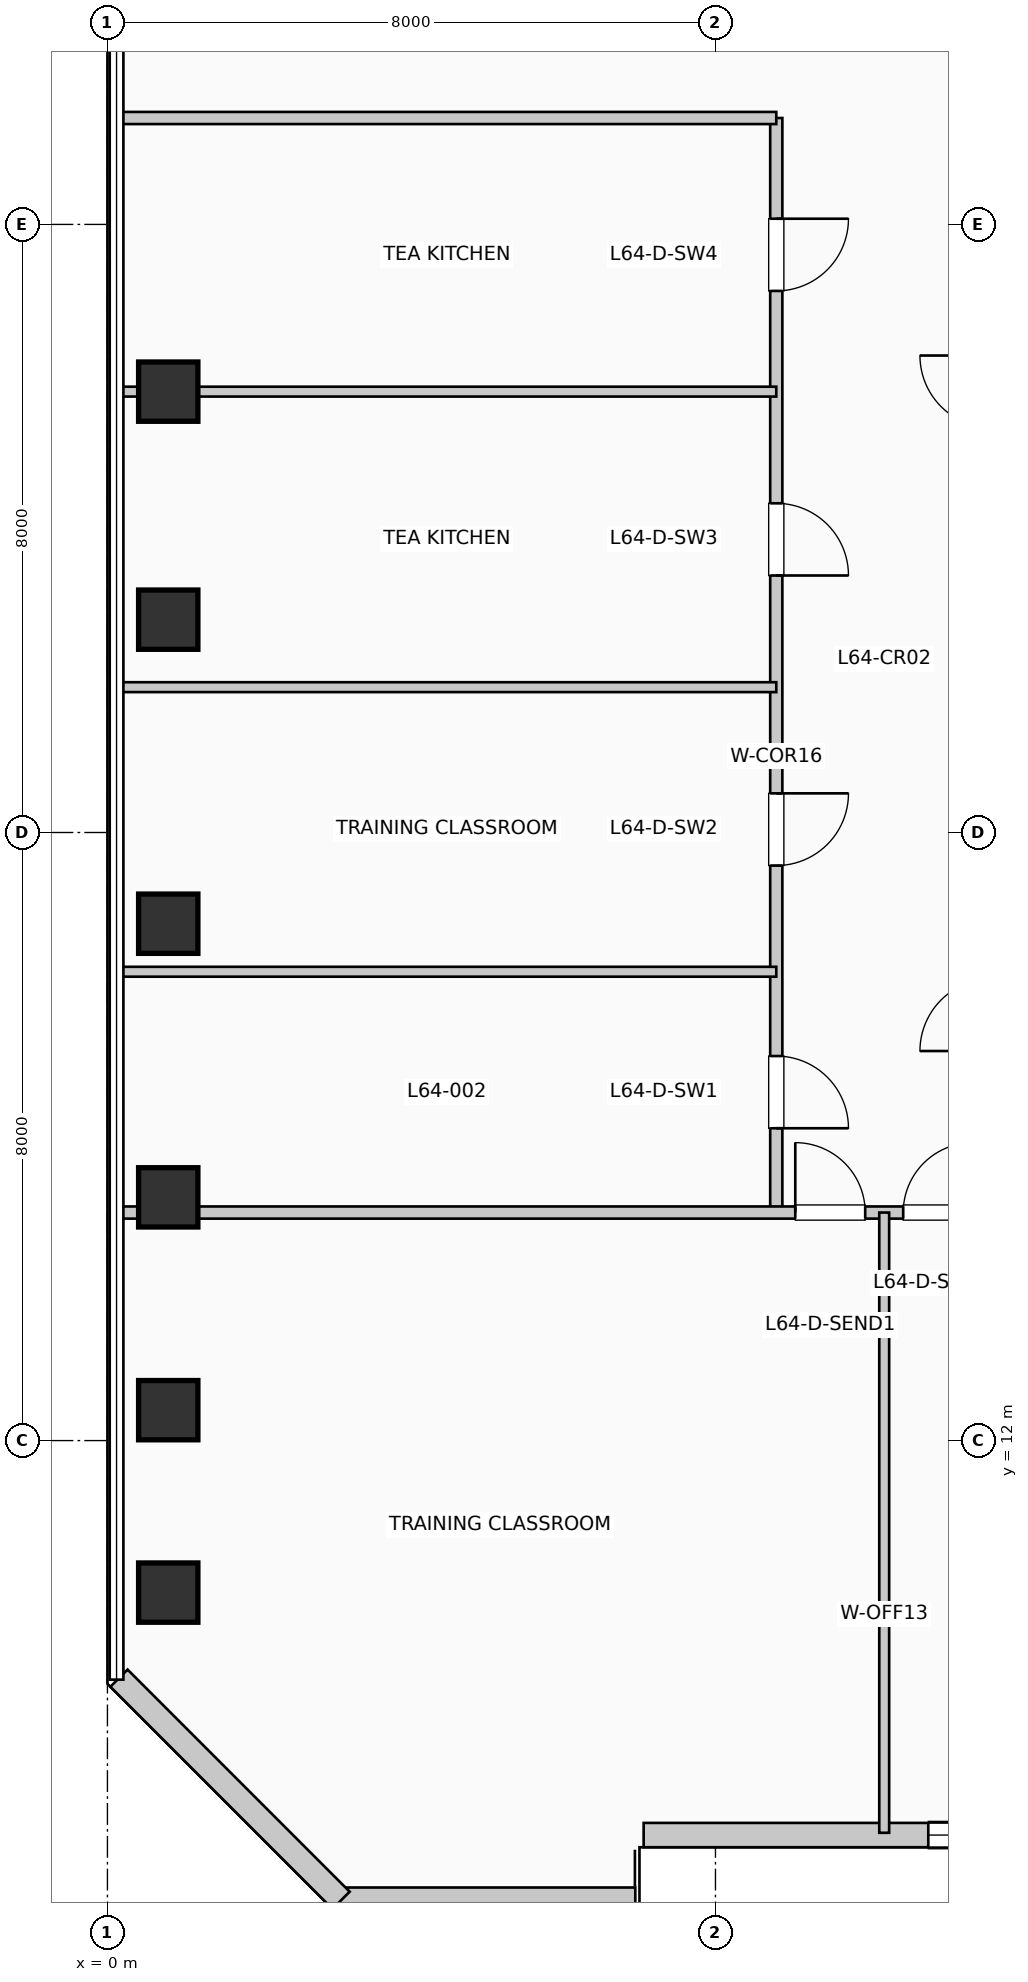
"""IFC4 building model, lengths in metres.
Left out: names, types, materials, properties, quantities, classifications, styles, units other than length and angle.
Written with IfcOpenShell. Run it as: python <this file> out.ifc"""

import sys

from ifc_helpers import new_model, si_unit, direction, frame, frame_2d, origin, origin_2d, place, context, subcontext, project, spatial, rectangle, extrude, element, fill, save


model = new_model("IFC4")
c1 = context("Model", 3, precision=1e-05, world=origin(), true_north=direction((0.0, 1.0)))
c2 = subcontext(c1, "Body", "Model", "MODEL_VIEW")
j1 = project(units=[si_unit("LENGTHUNIT", "METRE"), si_unit("PLANEANGLEUNIT", "RADIAN")], contexts=[c1])
p1 = place(None, origin())
s1 = spatial("IfcSite", under=j1, at=p1, CompositionType="ELEMENT")
p2 = place(p1, origin())
s2 = spatial("IfcBuilding", under=s1, at=p2, CompositionType="ELEMENT")
p3 = place(p2, frame((0.0, 0.0, 264.33)))
s3 = spatial("IfcBuildingStorey", under=s2, at=p3, CompositionType="ELEMENT", Elevation=264.33)
for number, where, z_axis, x_axis in (
    (1, (0.8, 10.0, 0.0), (0.0, 0.0, 1.0), (1.0, 0.0, 0.0)),
    (2, (0.8, 12.4, 0.0), (0.0, 0.0, 1.0), (1.0, 0.0, 0.0)),
    (3, (0.8, 15.2, 0.0), (0.0, 0.0, 1.0), (1.0, 0.0, 0.0)),
    (4, (0.8, 18.8, 0.0), (0.0, 0.0, 1.0), (1.0, 0.0, 0.0)),
    (5, (0.8, 22.8, 0.0), (0.0, 0.0, 1.0), (1.0, 0.0, 0.0)),
    (6, (0.8, 25.8, 0.0), (0.0, 0.0, 1.0), (1.0, 0.0, 0.0)),
):
    element("IfcColumn", number, at=place(p3, frame(where, z_axis=z_axis, x_axis=x_axis)), inside=s3, PredefinedType="COLUMN", context=c2, shape_type="SweptSolid", body=[
        extrude(rectangle(XDim=0.78, YDim=0.78, at=origin_2d()), origin(), (0.0, 0.0, 1.0), 3.96),
    ])
p4 = place(p3, frame((3.055, 5.96, 0.0), z_axis=(0.0, 0.0, 1.0), x_axis=(1.0, 0.0, 0.0)))
e7 = element("IfcWall", 7, at=p4, inside=s3, PredefinedType="SOLIDWALL", context=c2, shape_type="SweptSolid", body=[
    extrude(rectangle(XDim=3.89, YDim=0.32, at=frame_2d((1.945, 0.0))), origin(), (0.0, 0.0, 1.0), 3.71),
])
p5 = place(p3, frame((7.055, 6.81, 0.0), z_axis=(0.0, 0.0, 1.0), x_axis=(1.0, 0.0, 0.0)))
e8 = element("IfcWall", 8, at=p5, inside=s3, PredefinedType="SOLIDWALL", context=c2, shape_type="SweptSolid", body=[
    extrude(rectangle(XDim=9.89, YDim=0.32, at=frame_2d((4.945, 0.0))), origin(), (0.0, 0.0, 1.0), 3.71),
])
p6 = place(p5, frame((3.745, 0.0, 0.85)))
e9 = element("IfcOpeningElement", 9, at=p6, cuts=e8, PredefinedType="OPENING", context=c2, shape_type="SweptSolid", body=[
    extrude(rectangle(XDim=2.4, YDim=2.05, at=frame_2d((1.2, 1.025))), frame((0.0, 0.17, 0.0), z_axis=(0.0, -1.0, 0.0), x_axis=(1.0, 0.0, 0.0)), (0.0, 0.0, 1.0), 0.34),
])
p7 = place(p3, frame((0.152, 8.874, 0.0), z_axis=(0.0, 0.0, 1.0), x_axis=(0.707077242712, -0.707136318428, 0.0)))
e10 = element("IfcWall", 10, at=p7, inside=s3, PredefinedType="SOLIDWALL", context=c2, shape_type="SweptSolid", body=[
    extrude(rectangle(XDim=4.133, YDim=0.32, at=frame_2d((2.066, 0.0))), origin(), (0.0, 0.0, 1.0), 3.71),
])
p8 = place(p3, frame((8.8, 15.0, 0.0), z_axis=(0.0, 0.0, 1.0), x_axis=(0.0, 1.0, 0.0)))
e11 = element("IfcWall", 11, at=p8, inside=s3, PredefinedType="PARTITIONING", context=c2, shape_type="SweptSolid", body=[
    extrude(rectangle(XDim=14.4, YDim=0.16, at=frame_2d((7.2, 0.0))), origin(), (0.0, 0.0, 1.0), 3.71),
])
p9 = place(p8, frame((2.059, 0.0, 0.0), z_axis=(0.0, 0.0, 1.0), x_axis=(-1.0, 0.0, 0.0)))
e12 = element("IfcOpeningElement", 12, at=p9, cuts=e11, PredefinedType="OPENING", context=c2, shape_type="SweptSolid", body=[
    extrude(rectangle(XDim=0.95, YDim=2.15, at=frame_2d((0.475, 1.075))), frame((0.0, 0.09, 0.0), z_axis=(0.0, -1.0, 0.0), x_axis=(1.0, 0.0, 0.0)), (0.0, 0.0, 1.0), 0.18),
])
p10 = place(p8, frame((5.515, 0.0, 0.0), z_axis=(0.0, 0.0, 1.0), x_axis=(-1.0, 0.0, 0.0)))
e13 = element("IfcOpeningElement", 13, at=p10, cuts=e11, PredefinedType="OPENING", context=c2, shape_type="SweptSolid", body=[
    extrude(rectangle(XDim=0.95, YDim=2.15, at=frame_2d((0.475, 1.075))), frame((0.0, 0.09, 0.0), z_axis=(0.0, -1.0, 0.0), x_axis=(1.0, 0.0, 0.0)), (0.0, 0.0, 1.0), 0.18),
])
p11 = place(p8, frame((9.331, 0.0, 0.0), z_axis=(0.0, 0.0, 1.0), x_axis=(-1.0, 0.0, 0.0)))
e14 = element("IfcOpeningElement", 14, at=p11, cuts=e11, PredefinedType="OPENING", context=c2, shape_type="SweptSolid", body=[
    extrude(rectangle(XDim=0.95, YDim=2.15, at=frame_2d((0.475, 1.075))), frame((0.0, 0.09, 0.0), z_axis=(0.0, -1.0, 0.0), x_axis=(1.0, 0.0, 0.0)), (0.0, 0.0, 1.0), 0.18),
])
p12 = place(p8, frame((13.075, 0.0, 0.0), z_axis=(0.0, 0.0, 1.0), x_axis=(-1.0, 0.0, 0.0)))
e15 = element("IfcOpeningElement", 15, at=p12, cuts=e11, PredefinedType="OPENING", context=c2, shape_type="SweptSolid", body=[
    extrude(rectangle(XDim=0.95, YDim=2.15, at=frame_2d((0.475, 1.075))), frame((0.0, 0.09, 0.0), z_axis=(0.0, -1.0, 0.0), x_axis=(1.0, 0.0, 0.0)), (0.0, 0.0, 1.0), 0.18),
])
p13 = place(p3, frame((0.19, 15.0, 0.0), z_axis=(0.0, 0.0, 1.0), x_axis=(1.0, 0.0, 0.0)))
e16 = element("IfcWall", 16, at=p13, inside=s3, PredefinedType="PARTITIONING", context=c2, shape_type="SweptSolid", body=[
    extrude(rectangle(XDim=23.26, YDim=0.16, at=frame_2d((11.63, 0.0))), origin(), (0.0, 0.0, 1.0), 3.095),
])
p14 = place(p13, frame((8.86, 0.0, 0.0)))
e17 = element("IfcOpeningElement", 17, at=p14, cuts=e16, PredefinedType="OPENING", context=c2, shape_type="SweptSolid", body=[
    extrude(rectangle(XDim=0.92, YDim=2.1, at=frame_2d((0.46, 1.05))), frame((0.0, 0.09, 0.0), z_axis=(0.0, -1.0, 0.0), x_axis=(1.0, 0.0, 0.0)), (0.0, 0.0, 1.0), 0.18),
])
p15 = place(p13, frame((10.28, 0.0, 0.0)))
e18 = element("IfcOpeningElement", 18, at=p15, cuts=e16, PredefinedType="OPENING", context=c2, shape_type="SweptSolid", body=[
    extrude(rectangle(XDim=0.92, YDim=2.1, at=frame_2d((0.46, 1.05))), frame((0.0, 0.09, 0.0), z_axis=(0.0, -1.0, 0.0), x_axis=(1.0, 0.0, 0.0)), (0.0, 0.0, 1.0), 0.18),
])
p16 = place(p3, frame((0.19, 29.4, 0.0), z_axis=(0.0, 0.0, 1.0), x_axis=(1.0, 0.0, 0.0)))
e19 = element("IfcWall", 19, at=p16, inside=s3, PredefinedType="PARTITIONING", context=c2, shape_type="SweptSolid", body=[
    extrude(rectangle(XDim=8.61, YDim=0.16, at=frame_2d((4.305, 0.0))), origin(), (0.0, 0.0, 1.0), 3.365),
])
p17 = place(p3, frame((10.22, 6.84, 0.0), z_axis=(0.0, 0.0, 1.0), x_axis=(0.0, 1.0, 0.0)))
e20 = element("IfcWall", 20, at=p17, inside=s3, PredefinedType="PARTITIONING", context=c2, shape_type="SweptSolid", body=[
    extrude(rectangle(XDim=8.16, YDim=0.13, at=frame_2d((4.08, 0.0))), origin(), (0.0, 0.0, 1.0), 3.71),
])
for number, where, z_axis, x_axis in (
    (21, (0.19, 18.168, 0.0), (0.0, 0.0, 1.0), (1.0, 0.0, 0.0)),
    (22, (0.19, 21.912, 0.0), (0.0, 0.0, 1.0), (1.0, 0.0, 0.0)),
):
    element("IfcWall", number, at=place(p3, frame(where, z_axis=z_axis, x_axis=x_axis)), inside=s3, PredefinedType="PARTITIONING", context=c2, shape_type="SweptSolid", body=[
        extrude(rectangle(XDim=8.61, YDim=0.13, at=frame_2d((4.305, 0.0))), origin(), (0.0, 0.0, 1.0), 3.71),
    ])
p18 = place(p3, frame((0.19, 25.8, 0.0), z_axis=(0.0, 0.0, 1.0), x_axis=(1.0, 0.0, 0.0)))
e23 = element("IfcWall", 23, at=p18, inside=s3, PredefinedType="PARTITIONING", context=c2, shape_type="SweptSolid", body=[
    extrude(rectangle(XDim=8.61, YDim=0.13, at=frame_2d((4.305, 0.0))), origin(), (0.0, 0.0, 1.0), 3.095),
])
p19 = place(p6, origin())
e24 = element("IfcWindow", 24, at=p19, inside=s3, PartitioningType="SINGLE_PANEL", PredefinedType="WINDOW", context=c2, shape_type="SweptSolid", body=[
    extrude(rectangle(XDim=2.4, YDim=2.05, at=frame_2d((1.2, 1.025))), frame((0.0, 0.03, 0.0), z_axis=(0.0, -1.0, 0.0), x_axis=(1.0, 0.0, 0.0)), (0.0, 0.0, 1.0), 0.06),
])
fill(e9, e24)
p20 = place(p14, origin())
e25 = element("IfcDoor", 25, at=p20, inside=s3, OperationType="SINGLE_SWING_LEFT", PredefinedType="DOOR", context=c2, shape_type="SweptSolid", body=[
    extrude(rectangle(XDim=0.92, YDim=2.1, at=frame_2d((0.46, 1.05))), frame((0.0, 0.025, 0.0), z_axis=(0.0, -1.0, 0.0), x_axis=(1.0, 0.0, 0.0)), (0.0, 0.0, 1.0), 0.05),
])
fill(e17, e25)
p21 = place(p15, origin())
e26 = element("IfcDoor", 26, at=p21, inside=s3, OperationType="SINGLE_SWING_RIGHT", PredefinedType="DOOR", context=c2, shape_type="SweptSolid", body=[
    extrude(rectangle(XDim=0.92, YDim=2.1, at=frame_2d((0.46, 1.05))), frame((0.0, 0.025, 0.0), z_axis=(0.0, -1.0, 0.0), x_axis=(1.0, 0.0, 0.0)), (0.0, 0.0, 1.0), 0.05),
])
fill(e18, e26)
p22 = place(p9, origin())
e27 = element("IfcDoor", 27, at=p22, inside=s3, OperationType="SINGLE_SWING_LEFT", PredefinedType="DOOR", context=c2, shape_type="SweptSolid", body=[
    extrude(rectangle(XDim=0.95, YDim=2.15, at=frame_2d((0.475, 1.075))), frame((0.0, 0.025, 0.0), z_axis=(0.0, -1.0, 0.0), x_axis=(1.0, 0.0, 0.0)), (0.0, 0.0, 1.0), 0.05),
])
fill(e12, e27)
p23 = place(p10, origin())
e28 = element("IfcDoor", 28, at=p23, inside=s3, OperationType="SINGLE_SWING_RIGHT", PredefinedType="DOOR", context=c2, shape_type="SweptSolid", body=[
    extrude(rectangle(XDim=0.95, YDim=2.15, at=frame_2d((0.475, 1.075))), frame((0.0, 0.025, 0.0), z_axis=(0.0, -1.0, 0.0), x_axis=(1.0, 0.0, 0.0)), (0.0, 0.0, 1.0), 0.05),
])
fill(e13, e28)
p24 = place(p11, origin())
e29 = element("IfcDoor", 29, at=p24, inside=s3, OperationType="SINGLE_SWING_LEFT", PredefinedType="DOOR", context=c2, shape_type="SweptSolid", body=[
    extrude(rectangle(XDim=0.95, YDim=2.15, at=frame_2d((0.475, 1.075))), frame((0.0, 0.025, 0.0), z_axis=(0.0, -1.0, 0.0), x_axis=(1.0, 0.0, 0.0)), (0.0, 0.0, 1.0), 0.05),
])
fill(e14, e29)
p25 = place(p12, origin())
e30 = element("IfcDoor", 30, at=p25, inside=s3, OperationType="SINGLE_SWING_RIGHT", PredefinedType="DOOR", context=c2, shape_type="SweptSolid", body=[
    extrude(rectangle(XDim=0.95, YDim=2.15, at=frame_2d((0.475, 1.075))), frame((0.0, 0.025, 0.0), z_axis=(0.0, -1.0, 0.0), x_axis=(1.0, 0.0, 0.0)), (0.0, 0.0, 1.0), 0.05),
])
fill(e15, e30)
save(model, sys.argv[1])
